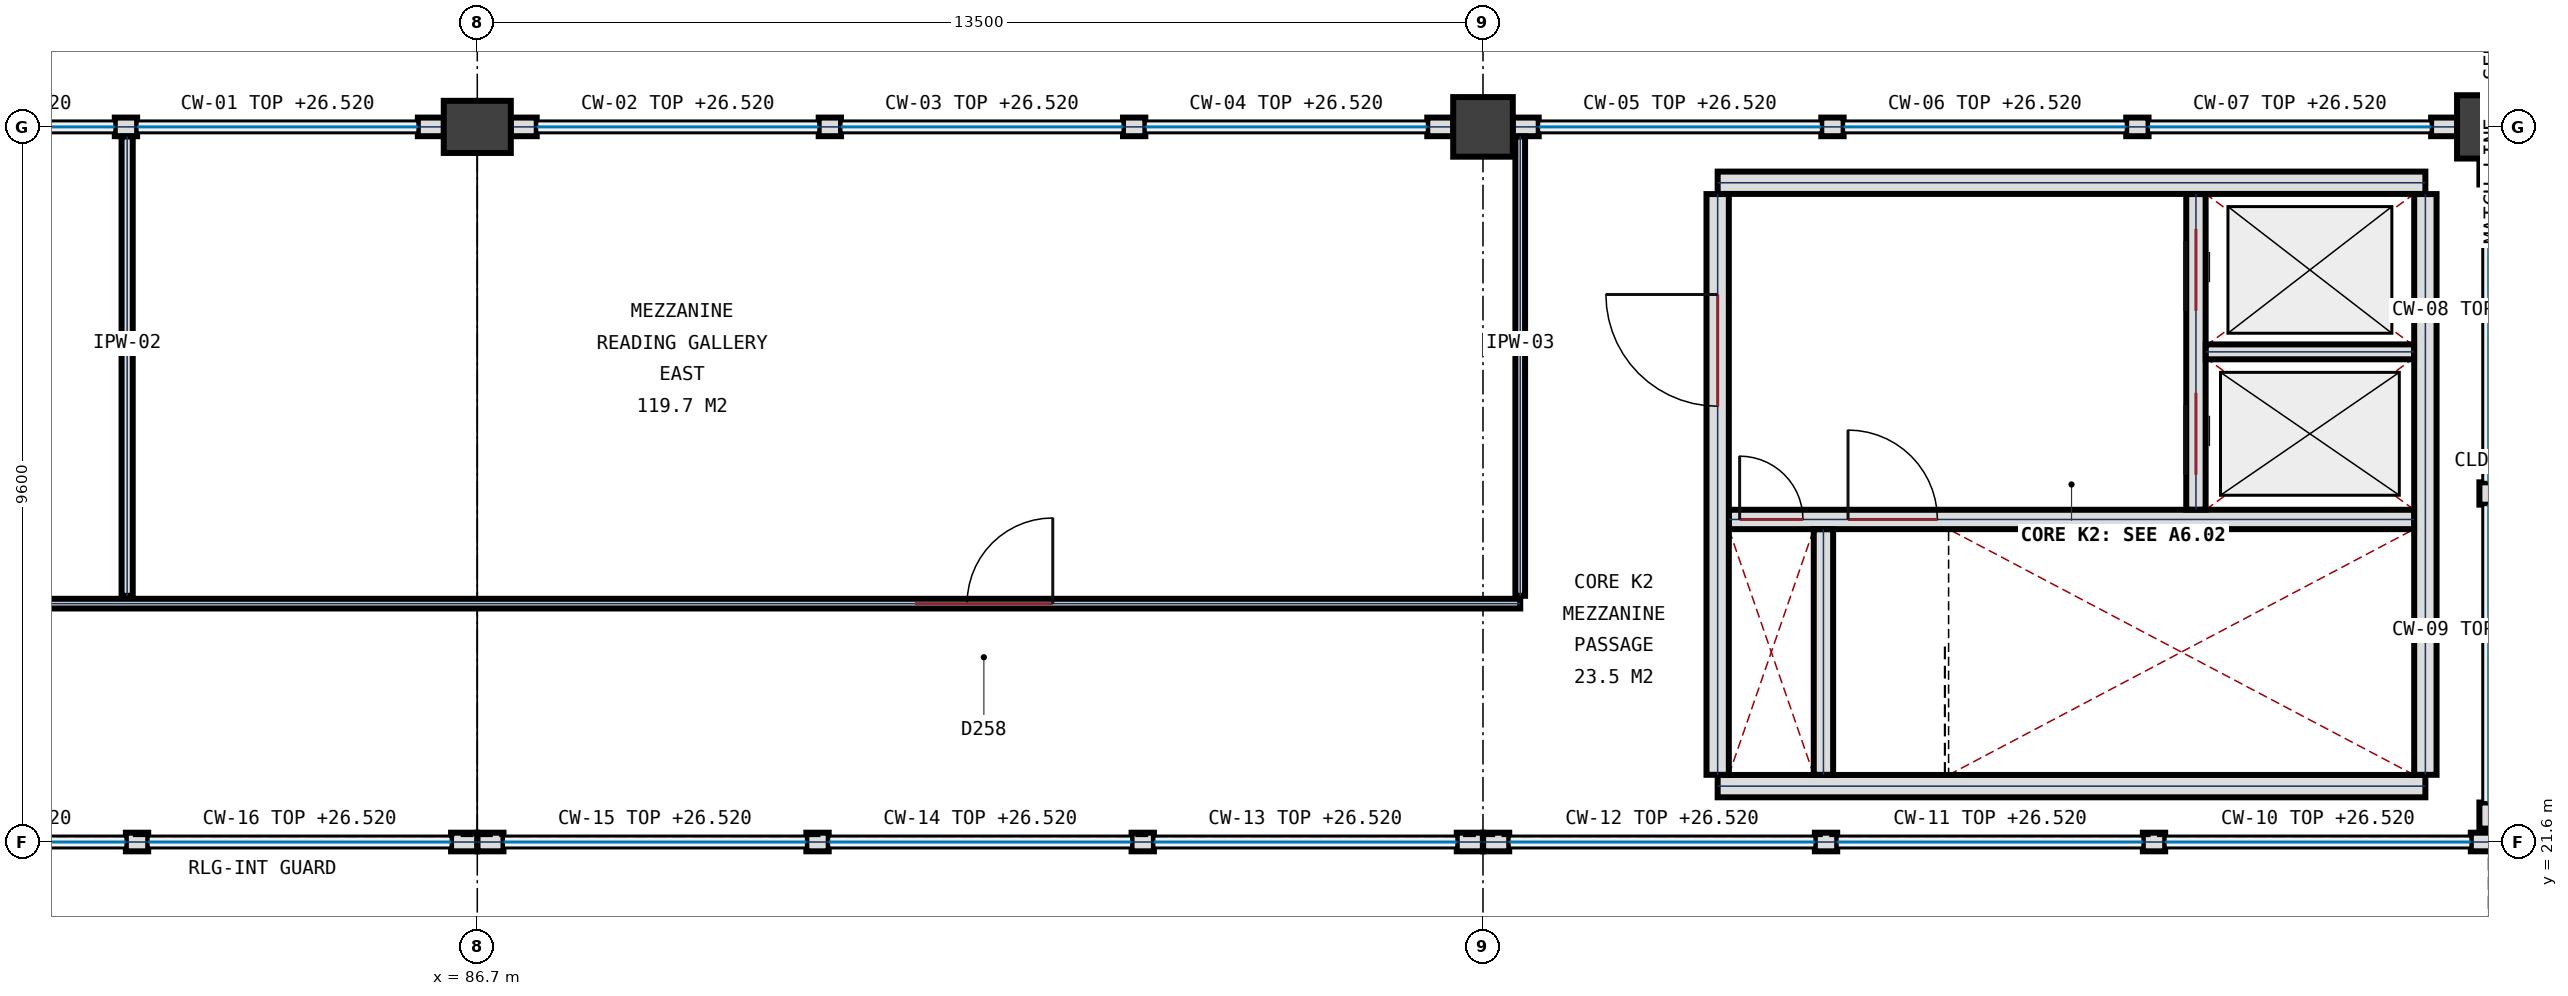
"""IFC4 building model, lengths in metres.
Left out: names, types, materials, properties, quantities, classifications, styles, units other than length and angle.
Written with IfcOpenShell. Run it as: python <this file> out.ifc"""

import sys

from ifc_helpers import new_model, si_unit, direction, frame, frame_2d, origin, origin_2d, place, context, subcontext, project, spatial, rectangle, extrude, element, fill, save


model = new_model("IFC4")
c1 = context("Model", 3, precision=1e-05, world=origin(), true_north=direction((0.0, 1.0)))
c2 = subcontext(c1, "Body", "Model", "MODEL_VIEW")
j1 = project(units=[si_unit("LENGTHUNIT", "METRE"), si_unit("PLANEANGLEUNIT", "RADIAN")], contexts=[c1])
p1 = place(None, origin())
s1 = spatial("IfcSite", under=j1, at=p1, CompositionType="ELEMENT")
p2 = place(p1, origin())
s2 = spatial("IfcBuilding", under=s1, at=p2, CompositionType="ELEMENT")
p3 = place(p2, frame((0.0, 0.0, 23.4)))
s3 = spatial("IfcBuildingStorey", under=s2, at=p3, CompositionType="ELEMENT", Elevation=23.4)
p4 = place(p3, frame((86.7, 31.2, 0.0), z_axis=(0.0, 0.0, 1.0), x_axis=(1.0, 0.0, 0.0)))
e1 = element("IfcColumn", 1, at=p4, inside=s3, PredefinedType="COLUMN", context=c2, shape_type="SweptSolid", body=[
    extrude(rectangle(XDim=0.9, YDim=0.7, at=origin_2d()), origin(), (0.0, 0.0, 1.0), 4.5),
])
p5 = place(p3, frame((100.2, 31.2, 0.0), z_axis=(0.0, 0.0, 1.0), x_axis=(1.0, 0.0, 0.0)))
e2 = element("IfcColumn", 2, at=p5, inside=s3, PredefinedType="COLUMN", context=c2, shape_type="SweptSolid", body=[
    extrude(rectangle(XDim=0.8, YDim=0.8, at=origin_2d()), origin(), (0.0, 0.0, 1.0), 4.5),
])
p6 = place(p3, frame((113.7, 31.2, 0.0), z_axis=(0.0, 0.0, 1.0), x_axis=(1.0, 0.0, 0.0)))
e3 = element("IfcColumn", 3, at=p6, inside=s3, PredefinedType="COLUMN", context=c2, shape_type="SweptSolid", body=[
    extrude(rectangle(XDim=0.85, YDim=0.85, at=origin_2d()), origin(), (0.0, 0.0, 1.0), 4.5),
])
p7 = place(p3, frame((85.902, 31.2, 0.0), z_axis=(0.0, 0.0, 1.0), x_axis=(1.0, 0.0, 0.0)))
e4 = element("IfcWall", 4, at=p7, inside=s3, PredefinedType="SOLIDWALL", context=c2, shape_type="SweptSolid", body=[
    extrude(rectangle(XDim=0.35, YDim=0.25, at=frame_2d((0.175, 0.0))), origin(), (0.0, 0.0, 1.0), 3.12),
])
p8 = place(p3, frame((81.834, 31.2, 0.0), z_axis=(0.0, 0.0, 1.0), x_axis=(1.0, 0.0, 0.0)))
e5 = element("IfcWall", 5, at=p8, inside=s3, PredefinedType="SOLIDWALL", context=c2, shape_type="SweptSolid", body=[
    extrude(rectangle(XDim=0.3, YDim=0.25, at=frame_2d((0.15, 0.0))), origin(), (0.0, 0.0, 1.0), 3.12),
])
for number, where, z_axis, x_axis in (
    (6, (87.148, 31.2, 0.0), (0.0, 0.0, 1.0), (1.0, 0.0, 0.0)),
    (7, (99.452, 31.2, 0.0), (0.0, 0.0, 1.0), (1.0, 0.0, 0.0)),
):
    element("IfcWall", number, at=place(p3, frame(where, z_axis=z_axis, x_axis=x_axis)), inside=s3, PredefinedType="SOLIDWALL", context=c2, shape_type="SweptSolid", body=[
        extrude(rectangle(XDim=0.35, YDim=0.25, at=frame_2d((0.175, 0.0))), origin(), (0.0, 0.0, 1.0), 3.12),
    ])
p9 = place(p3, frame((91.283, 31.2, 0.0), z_axis=(0.0, 0.0, 1.0), x_axis=(1.0, 0.0, 0.0)))
e8 = element("IfcWall", 8, at=p9, inside=s3, PredefinedType="SOLIDWALL", context=c2, shape_type="SweptSolid", body=[
    extrude(rectangle(XDim=0.3, YDim=0.25, at=frame_2d((0.15, 0.0))), origin(), (0.0, 0.0, 1.0), 3.12),
])
p10 = place(p3, frame((95.367, 31.2, 0.0), z_axis=(0.0, 0.0, 1.0), x_axis=(1.0, 0.0, 0.0)))
e9 = element("IfcWall", 9, at=p10, inside=s3, PredefinedType="SOLIDWALL", context=c2, shape_type="SweptSolid", body=[
    extrude(rectangle(XDim=0.3, YDim=0.25, at=frame_2d((0.15, 0.0))), origin(), (0.0, 0.0, 1.0), 3.12),
])
for number, where, z_axis, x_axis in (
    (10, (100.598, 31.2, 0.0), (0.0, 0.0, 1.0), (1.0, 0.0, 0.0)),
    (11, (112.927, 31.2, 0.0), (0.0, 0.0, 1.0), (1.0, 0.0, 0.0)),
):
    element("IfcWall", number, at=place(p3, frame(where, z_axis=z_axis, x_axis=x_axis)), inside=s3, PredefinedType="SOLIDWALL", context=c2, shape_type="SweptSolid", body=[
        extrude(rectangle(XDim=0.35, YDim=0.25, at=frame_2d((0.175, 0.0))), origin(), (0.0, 0.0, 1.0), 3.12),
    ])
for number, where, z_axis, x_axis in (
    (12, (104.741, 31.2, 0.0), (0.0, 0.0, 1.0), (1.0, 0.0, 0.0)),
    (13, (108.834, 31.2, 0.0), (0.0, 0.0, 1.0), (1.0, 0.0, 0.0)),
):
    element("IfcWall", number, at=place(p3, frame(where, z_axis=z_axis, x_axis=x_axis)), inside=s3, PredefinedType="SOLIDWALL", context=c2, shape_type="SweptSolid", body=[
        extrude(rectangle(XDim=0.3, YDim=0.25, at=frame_2d((0.15, 0.0))), origin(), (0.0, 0.0, 1.0), 3.12),
    ])
p11 = place(p3, frame((113.7, 30.777, 0.0), z_axis=(0.0, 0.0, 1.0), x_axis=(0.0, -1.0, 0.0)))
e14 = element("IfcWall", 14, at=p11, inside=s3, PredefinedType="SOLIDWALL", context=c2, shape_type="SweptSolid", body=[
    extrude(rectangle(XDim=0.35, YDim=0.25, at=frame_2d((0.175, 0.0))), origin(), (0.0, 0.0, 1.0), 3.12),
])
p12 = place(p3, frame((113.7, 22.13, 0.0), z_axis=(0.0, 0.0, 1.0), x_axis=(0.0, -1.0, 0.0)))
e15 = element("IfcWall", 15, at=p12, inside=s3, PredefinedType="SOLIDWALL", context=c2, shape_type="SweptSolid", body=[
    extrude(rectangle(XDim=0.35, YDim=0.25, at=frame_2d((0.175, 0.0))), origin(), (0.0, 0.0, 1.0), 3.12),
])
p13 = place(p3, frame((113.7, 26.428, 0.0), z_axis=(0.0, 0.0, 1.0), x_axis=(0.0, -1.0, 0.0)))
e16 = element("IfcWall", 16, at=p13, inside=s3, PredefinedType="SOLIDWALL", context=c2, shape_type="SweptSolid", body=[
    extrude(rectangle(XDim=0.3, YDim=0.25, at=frame_2d((0.15, 0.0))), origin(), (0.0, 0.0, 1.0), 3.12),
])
for number, where, z_axis, x_axis in (
    (17, (113.81, 21.6, 0.0), (0.0, 0.0, 1.0), (-1.0, 0.0, 0.0)),
    (18, (100.552, 21.6, 0.0), (0.0, 0.0, 1.0), (-1.0, 0.0, 0.0)),
):
    element("IfcWall", number, at=place(p3, frame(where, z_axis=z_axis, x_axis=x_axis)), inside=s3, PredefinedType="SOLIDWALL", context=c2, shape_type="SweptSolid", body=[
        extrude(rectangle(XDim=0.35, YDim=0.25, at=frame_2d((0.175, 0.0))), origin(), (0.0, 0.0, 1.0), 3.12),
    ])
p14 = place(p3, frame((109.357, 21.6, 0.0), z_axis=(0.0, 0.0, 1.0), x_axis=(-1.0, 0.0, 0.0)))
e19 = element("IfcWall", 19, at=p14, inside=s3, PredefinedType="SOLIDWALL", context=c2, shape_type="SweptSolid", body=[
    extrude(rectangle(XDim=0.3, YDim=0.25, at=frame_2d((0.15, 0.0))), origin(), (0.0, 0.0, 1.0), 3.12),
])
p15 = place(p3, frame((104.955, 21.6, 0.0), z_axis=(0.0, 0.0, 1.0), x_axis=(-1.0, 0.0, 0.0)))
e20 = element("IfcWall", 20, at=p15, inside=s3, PredefinedType="SOLIDWALL", context=c2, shape_type="SweptSolid", body=[
    extrude(rectangle(XDim=0.3, YDim=0.25, at=frame_2d((0.15, 0.0))), origin(), (0.0, 0.0, 1.0), 3.12),
])
for number, where, z_axis, x_axis in (
    (21, (100.198, 21.6, 0.0), (0.0, 0.0, 1.0), (-1.0, 0.0, 0.0)),
    (22, (87.052, 21.6, 0.0), (0.0, 0.0, 1.0), (-1.0, 0.0, 0.0)),
):
    element("IfcWall", number, at=place(p3, frame(where, z_axis=z_axis, x_axis=x_axis)), inside=s3, PredefinedType="SOLIDWALL", context=c2, shape_type="SweptSolid", body=[
        extrude(rectangle(XDim=0.35, YDim=0.25, at=frame_2d((0.175, 0.0))), origin(), (0.0, 0.0, 1.0), 3.12),
    ])
p16 = place(p3, frame((95.783, 21.6, 0.0), z_axis=(0.0, 0.0, 1.0), x_axis=(-1.0, 0.0, 0.0)))
e23 = element("IfcWall", 23, at=p16, inside=s3, PredefinedType="SOLIDWALL", context=c2, shape_type="SweptSolid", body=[
    extrude(rectangle(XDim=0.3, YDim=0.25, at=frame_2d((0.15, 0.0))), origin(), (0.0, 0.0, 1.0), 3.12),
])
p17 = place(p3, frame((91.417, 21.6, 0.0), z_axis=(0.0, 0.0, 1.0), x_axis=(-1.0, 0.0, 0.0)))
e24 = element("IfcWall", 24, at=p17, inside=s3, PredefinedType="SOLIDWALL", context=c2, shape_type="SweptSolid", body=[
    extrude(rectangle(XDim=0.3, YDim=0.25, at=frame_2d((0.15, 0.0))), origin(), (0.0, 0.0, 1.0), 3.12),
])
p18 = place(p3, frame((86.698, 21.6, 0.0), z_axis=(0.0, 0.0, 1.0), x_axis=(-1.0, 0.0, 0.0)))
e25 = element("IfcWall", 25, at=p18, inside=s3, PredefinedType="SOLIDWALL", context=c2, shape_type="SweptSolid", body=[
    extrude(rectangle(XDim=0.35, YDim=0.25, at=frame_2d((0.175, 0.0))), origin(), (0.0, 0.0, 1.0), 3.12),
])
p19 = place(p3, frame((82.283, 21.6, 0.0), z_axis=(0.0, 0.0, 1.0), x_axis=(-1.0, 0.0, 0.0)))
e26 = element("IfcWall", 26, at=p19, inside=s3, PredefinedType="SOLIDWALL", context=c2, shape_type="SweptSolid", body=[
    extrude(rectangle(XDim=0.3, YDim=0.25, at=frame_2d((0.15, 0.0))), origin(), (0.0, 0.0, 1.0), 3.12),
])
for number, where, z_axis, x_axis in (
    (27, (112.85, 22.35, 0.0), (0.0, 0.0, 1.0), (-1.0, 0.0, 0.0)),
    (28, (103.35, 30.45, 0.0), (0.0, 0.0, 1.0), (1.0, 0.0, 0.0)),
):
    element("IfcWall", number, at=place(p3, frame(where, z_axis=z_axis, x_axis=x_axis)), inside=s3, PredefinedType="SHEAR", context=c2, shape_type="SweptSolid", body=[
        extrude(rectangle(XDim=9.5, YDim=0.3, at=frame_2d((4.75, 0.0))), origin(), (0.0, 0.0, 1.0), 3.15),
    ])
p20 = place(p3, frame((103.35, 22.502, 0.0), z_axis=(0.0, 0.0, 1.0), x_axis=(0.0, 1.0, 0.0)))
e29 = element("IfcWall", 29, at=p20, inside=s3, PredefinedType="SHEAR", context=c2, shape_type="SweptSolid", body=[
    extrude(rectangle(XDim=7.796, YDim=0.3, at=frame_2d((3.898, 0.0))), origin(), (0.0, 0.0, 1.0), 3.15),
])
p21 = place(p20, frame((4.948, 0.0, 0.0)))
e30 = element("IfcOpeningElement", 30, at=p21, cuts=e29, PredefinedType="OPENING", context=c2, shape_type="SweptSolid", body=[
    extrude(rectangle(XDim=1.5, YDim=2.25, at=frame_2d((0.75, 1.125))), frame((0.0, 0.16, 0.0), z_axis=(0.0, -1.0, 0.0), x_axis=(1.0, 0.0, 0.0)), (0.0, 0.0, 1.0), 0.32),
])
p22 = place(p3, frame((112.85, 30.298, 0.0), z_axis=(0.0, 0.0, 1.0), x_axis=(0.0, -1.0, 0.0)))
e31 = element("IfcWall", 31, at=p22, inside=s3, PredefinedType="SHEAR", context=c2, shape_type="SweptSolid", body=[
    extrude(rectangle(XDim=7.796, YDim=0.3, at=frame_2d((3.898, 0.0))), origin(), (0.0, 0.0, 1.0), 3.15),
])
p23 = place(p3, frame((103.502, 25.93, 0.0), z_axis=(0.0, 0.0, 1.0), x_axis=(1.0, 0.0, 0.0)))
e32 = element("IfcWall", 32, at=p23, inside=s3, PredefinedType="SHEAR", context=c2, shape_type="SweptSolid", body=[
    extrude(rectangle(XDim=9.196, YDim=0.26, at=frame_2d((4.598, 0.0))), origin(), (0.0, 0.0, 1.0), 3.15),
])
p24 = place(p23, frame((1.598, 0.0, 0.0)))
e33 = element("IfcOpeningElement", 33, at=p24, cuts=e32, PredefinedType="OPENING", context=c2, shape_type="SweptSolid", body=[
    extrude(rectangle(XDim=1.2, YDim=2.2, at=frame_2d((0.6, 1.1))), frame((0.0, 0.14, 0.0), z_axis=(0.0, -1.0, 0.0), x_axis=(1.0, 0.0, 0.0)), (0.0, 0.0, 1.0), 0.28),
])
p25 = place(p23, frame((0.143, 0.0, 0.0)))
e34 = element("IfcOpeningElement", 34, at=p25, cuts=e32, PredefinedType="OPENING", context=c2, shape_type="SweptSolid", body=[
    extrude(rectangle(XDim=0.85, YDim=2.05, at=frame_2d((0.425, 1.025))), frame((0.0, 0.14, 0.0), z_axis=(0.0, -1.0, 0.0), x_axis=(1.0, 0.0, 0.0)), (0.0, 0.0, 1.0), 0.28),
])
p26 = place(p3, frame((104.77, 22.502, 0.0), z_axis=(0.0, 0.0, 1.0), x_axis=(0.0, 1.0, 0.0)))
e35 = element("IfcWall", 35, at=p26, inside=s3, PredefinedType="SHEAR", context=c2, shape_type="SweptSolid", body=[
    extrude(rectangle(XDim=3.296, YDim=0.26, at=frame_2d((1.648, 0.0))), origin(), (0.0, 0.0, 1.0), 3.15),
])
p27 = place(p3, frame((109.77, 26.062, 0.0), z_axis=(0.0, 0.0, 1.0), x_axis=(0.0, 1.0, 0.0)))
e36 = element("IfcWall", 36, at=p27, inside=s3, PredefinedType="SHEAR", context=c2, shape_type="SweptSolid", body=[
    extrude(rectangle(XDim=4.236, YDim=0.26, at=frame_2d((2.118, 0.0))), origin(), (0.0, 0.0, 1.0), 3.15),
])
p28 = place(p27, frame((0.468, 0.0, 0.0)))
e37 = element("IfcOpeningElement", 37, at=p28, cuts=e36, PredefinedType="OPENING", context=c2, shape_type="SweptSolid", body=[
    extrude(rectangle(XDim=1.1, YDim=2.15, at=frame_2d((0.55, 1.075))), frame((0.0, 0.14, 0.0), z_axis=(0.0, -1.0, 0.0), x_axis=(1.0, 0.0, 0.0)), (0.0, 0.0, 1.0), 0.28),
])
p29 = place(p27, frame((2.668, 0.0, 0.0)))
e38 = element("IfcOpeningElement", 38, at=p29, cuts=e36, PredefinedType="OPENING", context=c2, shape_type="SweptSolid", body=[
    extrude(rectangle(XDim=1.1, YDim=2.15, at=frame_2d((0.55, 1.075))), frame((0.0, 0.14, 0.0), z_axis=(0.0, -1.0, 0.0), x_axis=(1.0, 0.0, 0.0)), (0.0, 0.0, 1.0), 0.28),
])
p30 = place(p3, frame((109.902, 28.18, 0.0), z_axis=(0.0, 0.0, 1.0), x_axis=(1.0, 0.0, 0.0)))
e39 = element("IfcWall", 39, at=p30, inside=s3, PredefinedType="PLUMBINGWALL", context=c2, shape_type="SweptSolid", body=[
    extrude(rectangle(XDim=2.796, YDim=0.2, at=frame_2d((1.398, 0.0))), origin(), (0.0, 0.0, 1.0), 3.1),
])
p31 = place(p3, frame((59.2, 24.8, 0.0), z_axis=(0.0, 0.0, 1.0), x_axis=(1.0, 0.0, 0.0)))
e40 = element("IfcWall", 40, at=p31, inside=s3, PredefinedType="PARTITIONING", context=c2, shape_type="SweptSolid", body=[
    extrude(rectangle(XDim=41.5, YDim=0.13, at=frame_2d((20.75, 0.0))), origin(), (0.0, 0.0, 1.0), 3.1),
])
p32 = place(p31, frame((6.275, 0.0, 0.0)))
e41 = element("IfcOpeningElement", 41, at=p32, cuts=e40, PredefinedType="OPENING", context=c2, shape_type="SweptSolid", body=[
    extrude(rectangle(XDim=1.85, YDim=2.35, at=frame_2d((0.925, 1.175))), frame((0.0, 0.075, 0.0), z_axis=(0.0, -1.0, 0.0), x_axis=(1.0, 0.0, 0.0)), (0.0, 0.0, 1.0), 0.15),
])
p33 = place(p31, frame((33.375, 0.0, 0.0)))
e42 = element("IfcOpeningElement", 42, at=p33, cuts=e40, PredefinedType="OPENING", context=c2, shape_type="SweptSolid", body=[
    extrude(rectangle(XDim=1.85, YDim=2.35, at=frame_2d((0.925, 1.175))), frame((0.0, 0.075, 0.0), z_axis=(0.0, -1.0, 0.0), x_axis=(1.0, 0.0, 0.0)), (0.0, 0.0, 1.0), 0.15),
])
p34 = place(p3, frame((82.0, 24.905, 0.0), z_axis=(0.0, 0.0, 1.0), x_axis=(0.0, 1.0, 0.0)))
e43 = element("IfcWall", 43, at=p34, inside=s3, PredefinedType="PARTITIONING", context=c2, shape_type="SweptSolid", body=[
    extrude(rectangle(XDim=6.166, YDim=0.15, at=frame_2d((3.083, 0.0))), origin(), (0.0, 0.0, 1.0), 3.1),
])
p35 = place(p3, frame((100.7, 24.905, 0.0), z_axis=(0.0, 0.0, 1.0), x_axis=(0.0, 1.0, 0.0)))
e44 = element("IfcWall", 44, at=p35, inside=s3, PredefinedType="PARTITIONING", context=c2, shape_type="SweptSolid", body=[
    extrude(rectangle(XDim=6.166, YDim=0.13, at=frame_2d((3.083, 0.0))), origin(), (0.0, 0.0, 1.0), 3.1),
])
p36 = place(p21, origin())
e45 = element("IfcDoor", 45, at=p36, inside=s3, OperationType="SINGLE_SWING_RIGHT", PredefinedType="DOOR", context=c2, shape_type="SweptSolid", body=[
    extrude(rectangle(XDim=1.5, YDim=2.25, at=frame_2d((0.75, 1.125))), frame((0.0, 0.032, 0.0), z_axis=(0.0, -1.0, 0.0), x_axis=(1.0, 0.0, 0.0)), (0.0, 0.0, 1.0), 0.065),
])
fill(e30, e45)
p37 = place(p24, origin())
e46 = element("IfcDoor", 46, at=p37, inside=s3, OperationType="SINGLE_SWING_LEFT", PredefinedType="DOOR", context=c2, shape_type="SweptSolid", body=[
    extrude(rectangle(XDim=1.2, YDim=2.2, at=frame_2d((0.6, 1.1))), frame((0.0, 0.032, 0.0), z_axis=(0.0, -1.0, 0.0), x_axis=(1.0, 0.0, 0.0)), (0.0, 0.0, 1.0), 0.065),
])
fill(e33, e46)
p38 = place(p25, origin())
e47 = element("IfcDoor", 47, at=p38, inside=s3, OperationType="SINGLE_SWING_LEFT", PredefinedType="DOOR", context=c2, shape_type="SweptSolid", body=[
    extrude(rectangle(XDim=0.85, YDim=2.05, at=frame_2d((0.425, 1.025))), frame((0.0, 0.032, 0.0), z_axis=(0.0, -1.0, 0.0), x_axis=(1.0, 0.0, 0.0)), (0.0, 0.0, 1.0), 0.065),
])
fill(e34, e47)
p39 = place(p28, origin())
e48 = element("IfcDoor", 48, at=p39, inside=s3, OperationType="SLIDING_TO_LEFT", PredefinedType="DOOR", context=c2, shape_type="SweptSolid", body=[
    extrude(rectangle(XDim=1.1, YDim=2.15, at=frame_2d((0.55, 1.075))), frame((0.0, 0.032, 0.0), z_axis=(0.0, -1.0, 0.0), x_axis=(1.0, 0.0, 0.0)), (0.0, 0.0, 1.0), 0.065),
])
fill(e37, e48)
p40 = place(p29, origin())
e49 = element("IfcDoor", 49, at=p40, inside=s3, OperationType="SLIDING_TO_LEFT", PredefinedType="DOOR", context=c2, shape_type="SweptSolid", body=[
    extrude(rectangle(XDim=1.1, YDim=2.15, at=frame_2d((0.55, 1.075))), frame((0.0, 0.032, 0.0), z_axis=(0.0, -1.0, 0.0), x_axis=(1.0, 0.0, 0.0)), (0.0, 0.0, 1.0), 0.065),
])
fill(e38, e49)
p41 = place(p33, origin())
e50 = element("IfcDoor", 50, at=p41, inside=s3, OperationType="SINGLE_SWING_RIGHT", PredefinedType="DOOR", context=c2, shape_type="SweptSolid", body=[
    extrude(rectangle(XDim=1.85, YDim=2.35, at=frame_2d((0.925, 1.175))), frame((0.0, 0.032, 0.0), z_axis=(0.0, -1.0, 0.0), x_axis=(1.0, 0.0, 0.0)), (0.0, 0.0, 1.0), 0.065),
])
fill(e42, e50)
save(model, sys.argv[1])
